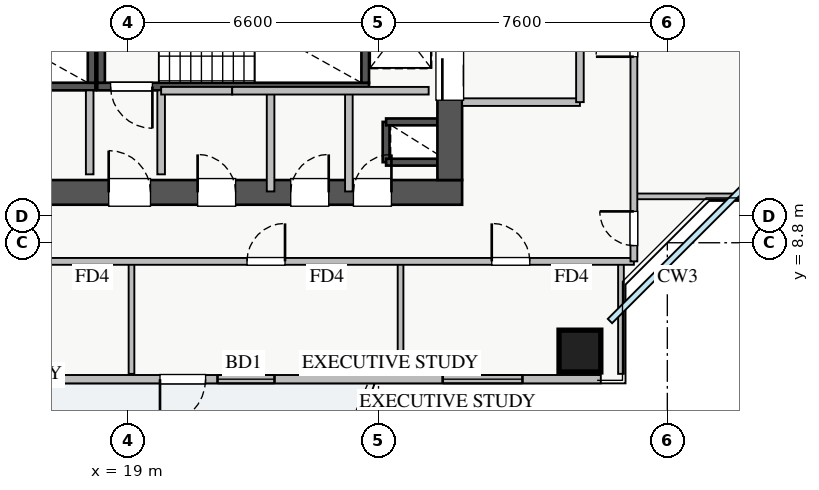
"""IFC4 building model, lengths in metres.
Left out: names, types, materials, properties, quantities, classifications, styles, units other than length and angle.
Written with IfcOpenShell. Run it as: python <this file> out.ifc"""

import sys

from ifc_helpers import new_model, si_unit, direction, frame, frame_2d, origin, origin_2d, place, context, subcontext, project, spatial, rectangle, extrude, source, transform, mapped, element, fill, save


model = new_model("IFC4")
c1 = context("Model", 3, precision=1e-05, world=origin(), true_north=direction((0.0, 1.0)))
c2 = subcontext(c1, "Body", "Model", "MODEL_VIEW")
j1 = project(units=[si_unit("LENGTHUNIT", "METRE"), si_unit("PLANEANGLEUNIT", "RADIAN")], contexts=[c1])
p1 = place(None, origin())
s1 = spatial("IfcSite", under=j1, at=p1, CompositionType="ELEMENT")
p2 = place(p1, origin())
s2 = spatial("IfcBuilding", under=s1, at=p2, CompositionType="ELEMENT")
p3 = place(p2, frame((0.0, 0.0, 110.0)))
s3 = spatial("IfcBuildingStorey", under=s2, at=p3, CompositionType="ELEMENT", Elevation=110.0)
p4 = place(p3, frame((25.8, 10.92, 0.0), z_axis=(0.0, 0.0, 1.0), x_axis=(0.0, 1.0, 0.0)))
e1 = element("IfcWall", 1, at=p4, inside=s3, PredefinedType="SHEAR", context=c2, shape_type="SweptSolid", body=[
    extrude(rectangle(XDim=1.06, YDim=0.18, at=frame_2d((0.53, 0.0))), origin(), (0.0, 0.0, 1.0), 3.07),
])
for number, where, z_axis, x_axis in (
    (2, (25.8, 11.98, 0.0), (0.0, 0.0, 1.0), (1.0, 0.0, 0.0)),
    (3, (25.8, 10.92, 0.0), (0.0, 0.0, 1.0), (1.0, 0.0, 0.0)),
):
    element("IfcWall", number, at=place(p3, frame(where, z_axis=z_axis, x_axis=x_axis)), inside=s3, PredefinedType="SHEAR", context=c2, shape_type="SweptSolid", body=[
        extrude(rectangle(XDim=1.35, YDim=0.18, at=frame_2d((0.675, 0.0))), origin(), (0.0, 0.0, 1.0), 3.07),
    ])
p5 = place(p3, frame((10.85, 12.91, 0.0), z_axis=(0.0, 0.0, 1.0), x_axis=(1.0, 0.0, 0.0)))
e4 = element("IfcWall", 4, at=p5, inside=s3, PredefinedType="SHEAR", context=c2, shape_type="SweptSolid", body=[
    extrude(rectangle(XDim=7.3, YDim=0.2, at=frame_2d((3.65, 0.0))), origin(), (0.0, 0.0, 1.0), 3.25),
])
p6 = place(p5, frame((0.35, 0.0, 0.0)))
e5 = element("IfcOpeningElement", 5, at=p6, cuts=e4, PredefinedType="OPENING", context=c2, shape_type="SweptSolid", body=[
    extrude(rectangle(XDim=1.1, YDim=2.05, at=frame_2d((0.55, 1.025))), frame((0.0, 0.11, 0.0), z_axis=(0.0, -1.0, 0.0), x_axis=(1.0, 0.0, 0.0)), (0.0, 0.0, 1.0), 0.22),
])
p7 = place(p3, frame((18.05, 13.01, 0.0), z_axis=(0.0, 0.0, 1.0), x_axis=(0.0, 1.0, 0.0)))
e6 = element("IfcWall", 6, at=p7, inside=s3, PredefinedType="SHEAR", context=c2, shape_type="SweptSolid", body=[
    extrude(rectangle(XDim=2.94, YDim=0.2, at=frame_2d((1.47, 0.0))), origin(), (0.0, 0.0, 1.0), 3.25),
])
p8 = place(p3, frame((18.2, 12.91, 0.0), z_axis=(0.0, 0.0, 1.0), x_axis=(1.0, 0.0, 0.0)))
e7 = element("IfcWall", 7, at=p8, inside=s3, PredefinedType="SHEAR", context=c2, shape_type="SweptSolid", body=[
    extrude(rectangle(XDim=7.15, YDim=0.2, at=frame_2d((3.575, 0.0))), origin(), (0.0, 0.0, 1.0), 3.25),
])
p9 = place(p8, frame((0.35, 0.0, 0.0)))
e8 = element("IfcOpeningElement", 8, at=p9, cuts=e7, PredefinedType="OPENING", context=c2, shape_type="SweptSolid", body=[
    extrude(rectangle(XDim=1.1, YDim=2.05, at=frame_2d((0.55, 1.025))), frame((0.0, 0.11, 0.0), z_axis=(0.0, -1.0, 0.0), x_axis=(1.0, 0.0, 0.0)), (0.0, 0.0, 1.0), 0.22),
])
for number, where, z_axis, x_axis in (
    (9, (18.3, 13.01, 0.0), (0.0, 0.0, 1.0), (0.0, 1.0, 0.0)),
    (10, (25.25, 13.01, 0.0), (0.0, 0.0, 1.0), (0.0, 1.0, 0.0)),
):
    element("IfcWall", number, at=place(p3, frame(where, z_axis=z_axis, x_axis=x_axis)), inside=s3, PredefinedType="SHEAR", context=c2, shape_type="SweptSolid", body=[
        extrude(rectangle(XDim=2.94, YDim=0.2, at=frame_2d((1.47, 0.0))), origin(), (0.0, 0.0, 1.0), 3.25),
    ])
p10 = place(p3, frame((10.2, 10.125, 0.0), z_axis=(0.0, 0.0, 1.0), x_axis=(1.0, 0.0, 0.0)))
e11 = element("IfcWall", 11, at=p10, inside=s3, PredefinedType="SHEAR", context=c2, shape_type="SweptSolid", body=[
    extrude(rectangle(XDim=17.6, YDim=0.65, at=frame_2d((8.8, 0.0))), origin(), (0.0, 0.0, 1.0), 3.25),
])
p11 = place(p10, frame((1.15, 0.0, 0.0)))
e12 = element("IfcOpeningElement", 12, at=p11, cuts=e11, PredefinedType="OPENING", context=c2, shape_type="SweptSolid", body=[
    extrude(rectangle(XDim=1.1, YDim=2.05, at=frame_2d((0.55, 1.025))), frame((0.0, 0.335, 0.0), z_axis=(0.0, -1.0, 0.0), x_axis=(1.0, 0.0, 0.0)), (0.0, 0.0, 1.0), 0.67),
])
p12 = place(p10, frame((8.3, 0.0, 0.0)))
e13 = element("IfcOpeningElement", 13, at=p12, cuts=e11, PredefinedType="OPENING", context=c2, shape_type="SweptSolid", body=[
    extrude(rectangle(XDim=1.1, YDim=2.05, at=frame_2d((0.55, 1.025))), frame((0.0, 0.335, 0.0), z_axis=(0.0, -1.0, 0.0), x_axis=(1.0, 0.0, 0.0)), (0.0, 0.0, 1.0), 0.67),
])
p13 = place(p10, frame((4.9, 0.0, 0.0)))
e14 = element("IfcOpeningElement", 14, at=p13, cuts=e11, PredefinedType="OPENING", context=c2, shape_type="SweptSolid", body=[
    extrude(rectangle(XDim=1.1, YDim=2.05, at=frame_2d((0.55, 1.025))), frame((0.0, 0.335, 0.0), z_axis=(0.0, -1.0, 0.0), x_axis=(1.0, 0.0, 0.0)), (0.0, 0.0, 1.0), 0.67),
])
p14 = place(p10, frame((14.74, 0.0, 0.0)))
e15 = element("IfcOpeningElement", 15, at=p14, cuts=e11, PredefinedType="OPENING", context=c2, shape_type="SweptSolid", body=[
    extrude(rectangle(XDim=1.0, YDim=2.05, at=frame_2d((0.5, 1.025))), frame((0.0, 0.335, 0.0), z_axis=(0.0, -1.0, 0.0), x_axis=(1.0, 0.0, 0.0)), (0.0, 0.0, 1.0), 0.67),
])
p15 = place(p10, frame((10.64, 0.0, 0.0)))
e16 = element("IfcOpeningElement", 16, at=p15, cuts=e11, PredefinedType="OPENING", context=c2, shape_type="SweptSolid", body=[
    extrude(rectangle(XDim=1.0, YDim=2.05, at=frame_2d((0.5, 1.025))), frame((0.0, 0.335, 0.0), z_axis=(0.0, -1.0, 0.0), x_axis=(1.0, 0.0, 0.0)), (0.0, 0.0, 1.0), 0.67),
])
p16 = place(p10, frame((13.09, 0.0, 0.0)))
e17 = element("IfcOpeningElement", 17, at=p16, cuts=e11, PredefinedType="OPENING", context=c2, shape_type="SweptSolid", body=[
    extrude(rectangle(XDim=1.0, YDim=2.05, at=frame_2d((0.5, 1.025))), frame((0.0, 0.335, 0.0), z_axis=(0.0, -1.0, 0.0), x_axis=(1.0, 0.0, 0.0)), (0.0, 0.0, 1.0), 0.67),
])
p17 = place(p3, frame((27.475, 10.45, 0.0), z_axis=(0.0, 0.0, 1.0), x_axis=(0.0, 1.0, 0.0)))
e18 = element("IfcWall", 18, at=p17, inside=s3, PredefinedType="SHEAR", context=c2, shape_type="SweptSolid", body=[
    extrude(rectangle(XDim=5.9, YDim=0.65, at=frame_2d((2.95, 0.0))), origin(), (0.0, 0.0, 1.0), 3.25),
])
p18 = place(p17, frame((2.1, 0.0, 0.0)))
e19 = element("IfcOpeningElement", 19, at=p18, cuts=e18, PredefinedType="OPENING", context=c2, shape_type="SweptSolid", body=[
    extrude(rectangle(XDim=1.3, YDim=2.05, at=frame_2d((0.65, 1.025))), frame((0.0, 0.335, 0.0), z_axis=(0.0, -1.0, 0.0), x_axis=(1.0, 0.0, 0.0)), (0.0, 0.0, 1.0), 0.67),
])
m1 = source(origin(), c2, "Body", "SweptSolid", [
    extrude(rectangle(XDim=1.1, YDim=1.1, at=origin_2d()), origin(), (0.0, 0.0, 1.0), 3.25),
])
p19 = place(p3, frame((30.9, 5.95, 0.0), z_axis=(0.0, 0.0, 1.0), x_axis=(1.0, 0.0, 0.0)))
e20 = element("IfcColumn", 20, at=p19, inside=s3, PredefinedType="COLUMN", context=c2, shape_type="MappedRepresentation", body=[
    mapped(m1, transform((0.0, 0.0, 0.0), x_axis=(1.0, 0.0, 0.0), y_axis=(0.0, 1.0, 0.0), z_axis=(0.0, 0.0, 1.0), scale=1.0)),
])
p20 = place(p3, frame((6.55, 5.21, 0.0), z_axis=(0.0, 0.0, 1.0), x_axis=(1.0, 0.0, 0.0)))
e21 = element("IfcWall", 21, at=p20, inside=s3, PredefinedType="STANDARD", context=c2, shape_type="SweptSolid", body=[
    extrude(rectangle(XDim=24.9, YDim=0.22, at=frame_2d((12.45, 0.0))), origin(), (0.0, 0.0, 1.0), 2.61),
])
p21 = place(p20, frame((13.3, 0.0, 0.0)))
e22 = element("IfcOpeningElement", 22, at=p21, cuts=e21, PredefinedType="OPENING", context=c2, shape_type="SweptSolid", body=[
    extrude(rectangle(XDim=1.2, YDim=2.1, at=frame_2d((0.6, 1.05))), frame((0.0, 0.12, 0.0), z_axis=(0.0, -1.0, 0.0), x_axis=(1.0, 0.0, 0.0)), (0.0, 0.0, 1.0), 0.24),
])
p22 = place(p20, frame((3.555, 0.0, 0.9)))
e23 = element("IfcOpeningElement", 23, at=p22, cuts=e21, PredefinedType="OPENING", context=c2, shape_type="SweptSolid", body=[
    extrude(rectangle(XDim=2.4, YDim=1.5, at=frame_2d((1.2, 0.75))), frame((0.0, 0.12, 0.0), z_axis=(0.0, -1.0, 0.0), x_axis=(1.0, 0.0, 0.0)), (0.0, 0.0, 1.0), 0.24),
])
p23 = place(p20, frame((8.438, 0.0, 0.9)))
e24 = element("IfcOpeningElement", 24, at=p23, cuts=e21, PredefinedType="OPENING", context=c2, shape_type="SweptSolid", body=[
    extrude(rectangle(XDim=1.8, YDim=1.45, at=frame_2d((0.9, 0.725))), frame((0.0, 0.12, 0.0), z_axis=(0.0, -1.0, 0.0), x_axis=(1.0, 0.0, 0.0)), (0.0, 0.0, 1.0), 0.24),
])
p24 = place(p20, frame((14.813, 0.0, 0.9)))
e25 = element("IfcOpeningElement", 25, at=p24, cuts=e21, PredefinedType="OPENING", context=c2, shape_type="SweptSolid", body=[
    extrude(rectangle(XDim=1.5, YDim=1.45, at=frame_2d((0.75, 0.725))), frame((0.0, 0.12, 0.0), z_axis=(0.0, -1.0, 0.0), x_axis=(1.0, 0.0, 0.0)), (0.0, 0.0, 1.0), 0.24),
])
p25 = place(p20, frame((20.738, 0.0, 0.9)))
e26 = element("IfcOpeningElement", 26, at=p25, cuts=e21, PredefinedType="OPENING", context=c2, shape_type="SweptSolid", body=[
    extrude(rectangle(XDim=2.1, YDim=1.48, at=frame_2d((1.05, 0.74))), frame((0.0, 0.12, 0.0), z_axis=(0.0, -1.0, 0.0), x_axis=(1.0, 0.0, 0.0)), (0.0, 0.0, 1.0), 0.24),
])
p26 = place(p3, frame((27.8, 12.5, 0.0), z_axis=(0.0, 0.0, 1.0), x_axis=(1.0, 0.0, 0.0)))
e27 = element("IfcWall", 27, at=p26, inside=s3, PredefinedType="PARTITIONING", context=c2, shape_type="SweptSolid", body=[
    extrude(rectangle(XDim=3.1, YDim=0.2, at=frame_2d((1.55, 0.0))), origin(), (0.0, 0.0, 1.0), 3.07),
])
p27 = place(p3, frame((30.9, 12.5, 0.0), z_axis=(0.0, 0.0, 1.0), x_axis=(0.0, 1.0, 0.0)))
e28 = element("IfcWall", 28, at=p27, inside=s3, PredefinedType="PARTITIONING", context=c2, shape_type="SweptSolid", body=[
    extrude(rectangle(XDim=3.9, YDim=0.2, at=frame_2d((1.95, 0.0))), origin(), (0.0, 0.0, 1.0), 3.07),
])
p28 = place(p27, frame((1.4, 0.0, 0.0)))
e29 = element("IfcOpeningElement", 29, at=p28, cuts=e28, PredefinedType="OPENING", context=c2, shape_type="SweptSolid", body=[
    extrude(rectangle(XDim=1.1, YDim=2.05, at=frame_2d((0.55, 1.025))), frame((0.0, 0.11, 0.0), z_axis=(0.0, -1.0, 0.0), x_axis=(1.0, 0.0, 0.0)), (0.0, 0.0, 1.0), 0.22),
])
for number, where, z_axis, x_axis in (
    (30, (18.0, 10.6, 0.0), (0.0, 0.0, 1.0), (0.0, 1.0, 0.0)),
    (31, (19.88, 10.6, 0.0), (0.0, 0.0, 1.0), (0.0, 1.0, 0.0)),
):
    element("IfcWall", number, at=place(p3, frame(where, z_axis=z_axis, x_axis=x_axis)), inside=s3, PredefinedType="PARTITIONING", context=c2, shape_type="SweptSolid", body=[
        extrude(rectangle(XDim=2.21, YDim=0.2, at=frame_2d((1.105, 0.0))), origin(), (0.0, 0.0, 1.0), 3.07),
    ])
p29 = place(p3, frame((24.82, 10.15, 0.0), z_axis=(0.0, 0.0, 1.0), x_axis=(0.0, 1.0, 0.0)))
e32 = element("IfcWall", 32, at=p29, inside=s3, PredefinedType="PARTITIONING", context=c2, shape_type="SweptSolid", body=[
    extrude(rectangle(XDim=2.65, YDim=0.2, at=frame_2d((1.325, 0.0))), origin(), (0.0, 0.0, 1.0), 3.07),
])
p30 = place(p3, frame((19.88, 12.8, 0.0), z_axis=(0.0, 0.0, 1.0), x_axis=(1.0, 0.0, 0.0)))
e33 = element("IfcWall", 33, at=p30, inside=s3, PredefinedType="PARTITIONING", context=c2, shape_type="SweptSolid", body=[
    extrude(rectangle(XDim=1.87, YDim=0.2, at=frame_2d((0.935, 0.0))), origin(), (0.0, 0.0, 1.0), 3.07),
])
p31 = place(p3, frame((22.76, 10.15, 0.0), z_axis=(0.0, 0.0, 1.0), x_axis=(0.0, 1.0, 0.0)))
e34 = element("IfcWall", 34, at=p31, inside=s3, PredefinedType="PARTITIONING", context=c2, shape_type="SweptSolid", body=[
    extrude(rectangle(XDim=2.65, YDim=0.2, at=frame_2d((1.325, 0.0))), origin(), (0.0, 0.0, 1.0), 3.07),
])
p32 = place(p3, frame((21.75, 12.8, 0.0), z_axis=(0.0, 0.0, 1.0), x_axis=(1.0, 0.0, 0.0)))
e35 = element("IfcWall", 35, at=p32, inside=s3, PredefinedType="PARTITIONING", context=c2, shape_type="SweptSolid", body=[
    extrude(rectangle(XDim=5.17, YDim=0.2, at=frame_2d((2.585, 0.0))), origin(), (0.0, 0.0, 1.0), 3.07),
])
p33 = place(p3, frame((19.1, 5.35, 0.0), z_axis=(0.0, 0.0, 1.0), x_axis=(0.0, 1.0, 0.0)))
e36 = element("IfcWall", 36, at=p33, inside=s3, PredefinedType="PARTITIONING", context=c2, shape_type="SweptSolid", body=[
    extrude(rectangle(XDim=2.96, YDim=0.15, at=frame_2d((1.48, 0.0))), origin(), (0.0, 0.0, 1.0), 2.765),
])
for number, where, z_axis, x_axis in (
    (37, (26.18, 5.35, 0.0), (0.0, 0.0, 1.0), (0.0, 1.0, 0.0)),
    (38, (31.98, 5.35, 0.0), (0.0, 0.0, 1.0), (0.0, 1.0, 0.0)),
):
    element("IfcWall", number, at=place(p3, frame(where, z_axis=z_axis, x_axis=x_axis)), inside=s3, PredefinedType="PARTITIONING", context=c2, shape_type="SweptSolid", body=[
        extrude(rectangle(XDim=2.96, YDim=0.15, at=frame_2d((1.48, 0.0))), origin(), (0.0, 0.0, 1.0), 3.07),
    ])
p34 = place(p3, frame((8.78, 8.31, 0.0), z_axis=(0.0, 0.0, 1.0), x_axis=(1.0, 0.0, 0.0)))
e39 = element("IfcWall", 39, at=p34, inside=s3, PredefinedType="PARTITIONING", context=c2, shape_type="SweptSolid", body=[
    extrude(rectangle(XDim=23.54, YDim=0.18, at=frame_2d((11.77, 0.0))), origin(), (0.0, 0.0, 1.0), 3.07),
])
p35 = place(p34, frame((2.025, 0.0, 0.0)))
e40 = element("IfcOpeningElement", 40, at=p35, cuts=e39, PredefinedType="OPENING", context=c2, shape_type="SweptSolid", body=[
    extrude(rectangle(XDim=1.0, YDim=2.05, at=frame_2d((0.5, 1.025))), frame((0.0, 0.1, 0.0), z_axis=(0.0, -1.0, 0.0), x_axis=(1.0, 0.0, 0.0)), (0.0, 0.0, 1.0), 0.2),
])
p36 = place(p34, frame((7.185, 0.0, 0.0)))
e41 = element("IfcOpeningElement", 41, at=p36, cuts=e39, PredefinedType="OPENING", context=c2, shape_type="SweptSolid", body=[
    extrude(rectangle(XDim=1.0, YDim=2.05, at=frame_2d((0.5, 1.025))), frame((0.0, 0.1, 0.0), z_axis=(0.0, -1.0, 0.0), x_axis=(1.0, 0.0, 0.0)), (0.0, 0.0, 1.0), 0.2),
])
p37 = place(p34, frame((13.36, 0.0, 0.0)))
e42 = element("IfcOpeningElement", 42, at=p37, cuts=e39, PredefinedType="OPENING", context=c2, shape_type="SweptSolid", body=[
    extrude(rectangle(XDim=1.0, YDim=2.05, at=frame_2d((0.5, 1.025))), frame((0.0, 0.1, 0.0), z_axis=(0.0, -1.0, 0.0), x_axis=(1.0, 0.0, 0.0)), (0.0, 0.0, 1.0), 0.2),
])
p38 = place(p34, frame((19.8, 0.0, 0.0)))
e43 = element("IfcOpeningElement", 43, at=p38, cuts=e39, PredefinedType="OPENING", context=c2, shape_type="SweptSolid", body=[
    extrude(rectangle(XDim=1.0, YDim=2.05, at=frame_2d((0.5, 1.025))), frame((0.0, 0.1, 0.0), z_axis=(0.0, -1.0, 0.0), x_axis=(1.0, 0.0, 0.0)), (0.0, 0.0, 1.0), 0.2),
])
p39 = place(p3, frame((32.32, 10.02, 0.0), z_axis=(0.0, 0.0, 1.0), x_axis=(1.0, 0.0, 0.0)))
e44 = element("IfcWall", 44, at=p39, inside=s3, PredefinedType="PARTITIONING", context=c2, shape_type="SweptSolid", body=[
    extrude(rectangle(XDim=4.33, YDim=0.15, at=frame_2d((2.165, 0.0))), origin(), (0.0, 0.0, 1.0), 3.07),
])
p40 = place(p3, frame((32.32, 8.31, 0.0), z_axis=(0.0, 0.0, 1.0), x_axis=(0.0, 1.0, 0.0)))
e45 = element("IfcWall", 45, at=p40, inside=s3, PredefinedType="PARTITIONING", context=c2, shape_type="SweptSolid", body=[
    extrude(rectangle(XDim=29.34, YDim=0.18, at=frame_2d((14.67, 0.0))), origin(), (0.0, 0.0, 1.0), 3.07),
])
p41 = place(p40, frame((28.045, 0.0, 0.0)))
e46 = element("IfcOpeningElement", 46, at=p41, cuts=e45, PredefinedType="OPENING", context=c2, shape_type="SweptSolid", body=[
    extrude(rectangle(XDim=0.9, YDim=2.05, at=frame_2d((0.45, 1.025))), frame((0.0, 0.1, 0.0), z_axis=(0.0, -1.0, 0.0), x_axis=(1.0, 0.0, 0.0)), (0.0, 0.0, 1.0), 0.2),
])
p42 = place(p40, frame((0.415, 0.0, 0.0)))
e47 = element("IfcOpeningElement", 47, at=p42, cuts=e45, PredefinedType="OPENING", context=c2, shape_type="SweptSolid", body=[
    extrude(rectangle(XDim=0.9, YDim=2.05, at=frame_2d((0.45, 1.025))), frame((0.0, 0.1, 0.0), z_axis=(0.0, -1.0, 0.0), x_axis=(1.0, 0.0, 0.0)), (0.0, 0.0, 1.0), 0.2),
])
p43 = place(p40, frame((5.385, 0.0, 0.0)))
e48 = element("IfcOpeningElement", 48, at=p43, cuts=e45, PredefinedType="OPENING", context=c2, shape_type="SweptSolid", body=[
    extrude(rectangle(XDim=1.0, YDim=2.05, at=frame_2d((0.5, 1.025))), frame((0.0, 0.1, 0.0), z_axis=(0.0, -1.0, 0.0), x_axis=(1.0, 0.0, 0.0)), (0.0, 0.0, 1.0), 0.2),
])
p44 = place(p40, frame((11.735, 0.0, 0.0)))
e49 = element("IfcOpeningElement", 49, at=p44, cuts=e45, PredefinedType="OPENING", context=c2, shape_type="SweptSolid", body=[
    extrude(rectangle(XDim=1.0, YDim=2.05, at=frame_2d((0.5, 1.025))), frame((0.0, 0.1, 0.0), z_axis=(0.0, -1.0, 0.0), x_axis=(1.0, 0.0, 0.0)), (0.0, 0.0, 1.0), 0.2),
])
p45 = place(p40, frame((20.835, 0.0, 0.0)))
e50 = element("IfcOpeningElement", 50, at=p45, cuts=e45, PredefinedType="OPENING", context=c2, shape_type="SweptSolid", body=[
    extrude(rectangle(XDim=1.0, YDim=2.05, at=frame_2d((0.5, 1.025))), frame((0.0, 0.1, 0.0), z_axis=(0.0, -1.0, 0.0), x_axis=(1.0, 0.0, 0.0)), (0.0, 0.0, 1.0), 0.2),
])
m2 = source(origin(), c2, "Body", "SweptSolid", [
    extrude(rectangle(XDim=1.2, YDim=2.1, at=frame_2d((0.6, 1.05))), frame((0.0, 0.025, 0.0), z_axis=(0.0, -1.0, 0.0), x_axis=(1.0, 0.0, 0.0)), (0.0, 0.0, 1.0), 0.05),
])
p46 = place(p21, frame((1.2, 0.0, 0.0), z_axis=(0.0, 0.0, 1.0), x_axis=(-1.0, 0.0, 0.0)))
e51 = element("IfcDoor", 51, at=p46, inside=s3, OperationType="SINGLE_SWING_LEFT", PredefinedType="DOOR", context=c2, shape_type="MappedRepresentation", body=[
    mapped(m2, transform((0.0, 0.0, 0.0), x_axis=(1.0, 0.0, 0.0), y_axis=(0.0, 1.0, 0.0), z_axis=(0.0, 0.0, 1.0), scale=1.0)),
])
fill(e22, e51)
m3 = source(origin(), c2, "Body", "SweptSolid", [
    extrude(rectangle(XDim=1.5, YDim=1.45, at=frame_2d((0.75, 0.725))), frame((0.0, 0.03, 0.0), z_axis=(0.0, -1.0, 0.0), x_axis=(1.0, 0.0, 0.0)), (0.0, 0.0, 1.0), 0.06),
])
p47 = place(p24, origin())
e52 = element("IfcWindow", 52, at=p47, inside=s3, PartitioningType="DOUBLE_PANEL_VERTICAL", PredefinedType="WINDOW", context=c2, shape_type="MappedRepresentation", body=[
    mapped(m3, transform((0.0, 0.0, 0.0), x_axis=(1.0, 0.0, 0.0), y_axis=(0.0, 1.0, 0.0), z_axis=(0.0, 0.0, 1.0), scale=1.0)),
])
fill(e25, e52)
m4 = source(origin(), c2, "Body", "SweptSolid", [
    extrude(rectangle(XDim=2.1, YDim=1.48, at=frame_2d((1.05, 0.74))), frame((0.0, 0.03, 0.0), z_axis=(0.0, -1.0, 0.0), x_axis=(1.0, 0.0, 0.0)), (0.0, 0.0, 1.0), 0.06),
])
p48 = place(p25, origin())
e53 = element("IfcWindow", 53, at=p48, inside=s3, PartitioningType="TRIPLE_PANEL_VERTICAL", PredefinedType="WINDOW", context=c2, shape_type="MappedRepresentation", body=[
    mapped(m4, transform((0.0, 0.0, 0.0), x_axis=(1.0, 0.0, 0.0), y_axis=(0.0, 1.0, 0.0), z_axis=(0.0, 0.0, 1.0), scale=1.0)),
])
fill(e26, e53)
m5 = source(origin(), c2, "Body", "SweptSolid", [
    extrude(rectangle(XDim=1.3, YDim=2.05, at=frame_2d((0.65, 1.025))), frame((0.0, 0.025, 0.0), z_axis=(0.0, -1.0, 0.0), x_axis=(1.0, 0.0, 0.0)), (0.0, 0.0, 1.0), 0.05),
])
p49 = place(p18, origin())
e54 = element("IfcDoor", 54, at=p49, inside=s3, OperationType="SLIDING_TO_RIGHT", PredefinedType="DOOR", context=c2, shape_type="MappedRepresentation", body=[
    mapped(m5, transform((0.0, 0.0, 0.0), x_axis=(1.0, 0.0, 0.0), y_axis=(0.0, 1.0, 0.0), z_axis=(0.0, 0.0, 1.0), scale=1.0)),
])
fill(e19, e54)
m6 = source(origin(), c2, "Body", "SweptSolid", [
    extrude(rectangle(XDim=1.1, YDim=2.05, at=frame_2d((0.55, 1.025))), frame((0.0, 0.025, 0.0), z_axis=(0.0, -1.0, 0.0), x_axis=(1.0, 0.0, 0.0)), (0.0, 0.0, 1.0), 0.05),
])
p50 = place(p12, origin())
e55 = element("IfcDoor", 55, at=p50, inside=s3, OperationType="SINGLE_SWING_LEFT", PredefinedType="DOOR", context=c2, shape_type="MappedRepresentation", body=[
    mapped(m6, transform((0.0, 0.0, 0.0), x_axis=(1.0, 0.0, 0.0), y_axis=(0.0, 1.0, 0.0), z_axis=(0.0, 0.0, 1.0), scale=1.0)),
])
fill(e13, e55)
p51 = place(p9, frame((1.1, 0.0, 0.0), z_axis=(0.0, 0.0, 1.0), x_axis=(-1.0, 0.0, 0.0)))
e56 = element("IfcDoor", 56, at=p51, inside=s3, OperationType="SINGLE_SWING_RIGHT", PredefinedType="DOOR", context=c2, shape_type="MappedRepresentation", body=[
    mapped(m6, transform((0.0, 0.0, 0.0), x_axis=(1.0, 0.0, 0.0), y_axis=(0.0, 1.0, 0.0), z_axis=(0.0, 0.0, 1.0), scale=1.0)),
])
fill(e8, e56)
m7 = source(origin(), c2, "Body", "SweptSolid", [
    extrude(rectangle(XDim=1.0, YDim=2.05, at=frame_2d((0.5, 1.025))), frame((0.0, 0.025, 0.0), z_axis=(0.0, -1.0, 0.0), x_axis=(1.0, 0.0, 0.0)), (0.0, 0.0, 1.0), 0.05),
])
p52 = place(p14, origin())
e57 = element("IfcDoor", 57, at=p52, inside=s3, OperationType="SINGLE_SWING_RIGHT", PredefinedType="DOOR", context=c2, shape_type="MappedRepresentation", body=[
    mapped(m7, transform((0.0, 0.0, 0.0), x_axis=(1.0, 0.0, 0.0), y_axis=(0.0, 1.0, 0.0), z_axis=(0.0, 0.0, 1.0), scale=1.0)),
])
fill(e15, e57)
p53 = place(p15, origin())
e58 = element("IfcDoor", 58, at=p53, inside=s3, OperationType="SINGLE_SWING_LEFT", PredefinedType="DOOR", context=c2, shape_type="MappedRepresentation", body=[
    mapped(m7, transform((0.0, 0.0, 0.0), x_axis=(1.0, 0.0, 0.0), y_axis=(0.0, 1.0, 0.0), z_axis=(0.0, 0.0, 1.0), scale=1.0)),
])
fill(e16, e58)
p54 = place(p16, origin())
e59 = element("IfcDoor", 59, at=p54, inside=s3, OperationType="SINGLE_SWING_RIGHT", PredefinedType="DOOR", context=c2, shape_type="MappedRepresentation", body=[
    mapped(m7, transform((0.0, 0.0, 0.0), x_axis=(1.0, 0.0, 0.0), y_axis=(0.0, 1.0, 0.0), z_axis=(0.0, 0.0, 1.0), scale=1.0)),
])
fill(e17, e59)
p55 = place(p37, origin())
e60 = element("IfcDoor", 60, at=p55, inside=s3, OperationType="SINGLE_SWING_RIGHT", PredefinedType="DOOR", context=c2, shape_type="MappedRepresentation", body=[
    mapped(m7, transform((0.0, 0.0, 0.0), x_axis=(1.0, 0.0, 0.0), y_axis=(0.0, 1.0, 0.0), z_axis=(0.0, 0.0, 1.0), scale=1.0)),
])
fill(e42, e60)
p56 = place(p38, origin())
e61 = element("IfcDoor", 61, at=p56, inside=s3, OperationType="SINGLE_SWING_LEFT", PredefinedType="DOOR", context=c2, shape_type="MappedRepresentation", body=[
    mapped(m7, transform((0.0, 0.0, 0.0), x_axis=(1.0, 0.0, 0.0), y_axis=(0.0, 1.0, 0.0), z_axis=(0.0, 0.0, 1.0), scale=1.0)),
])
fill(e43, e61)
m8 = source(origin(), c2, "Body", "SweptSolid", [
    extrude(rectangle(XDim=0.9, YDim=2.05, at=frame_2d((0.45, 1.025))), frame((0.0, 0.025, 0.0), z_axis=(0.0, -1.0, 0.0), x_axis=(1.0, 0.0, 0.0)), (0.0, 0.0, 1.0), 0.05),
])
p57 = place(p42, origin())
e62 = element("IfcDoor", 62, at=p57, inside=s3, OperationType="SINGLE_SWING_RIGHT", PredefinedType="DOOR", context=c2, shape_type="MappedRepresentation", body=[
    mapped(m8, transform((0.0, 0.0, 0.0), x_axis=(1.0, 0.0, 0.0), y_axis=(0.0, 1.0, 0.0), z_axis=(0.0, 0.0, 1.0), scale=1.0)),
])
fill(e47, e62)
p58 = place(p43, origin())
e63 = element("IfcDoor", 63, at=p58, inside=s3, OperationType="SINGLE_SWING_LEFT", PredefinedType="DOOR", context=c2, shape_type="MappedRepresentation", body=[
    mapped(m7, transform((0.0, 0.0, 0.0), x_axis=(1.0, 0.0, 0.0), y_axis=(0.0, 1.0, 0.0), z_axis=(0.0, 0.0, 1.0), scale=1.0)),
])
fill(e48, e63)
save(model, sys.argv[1])
